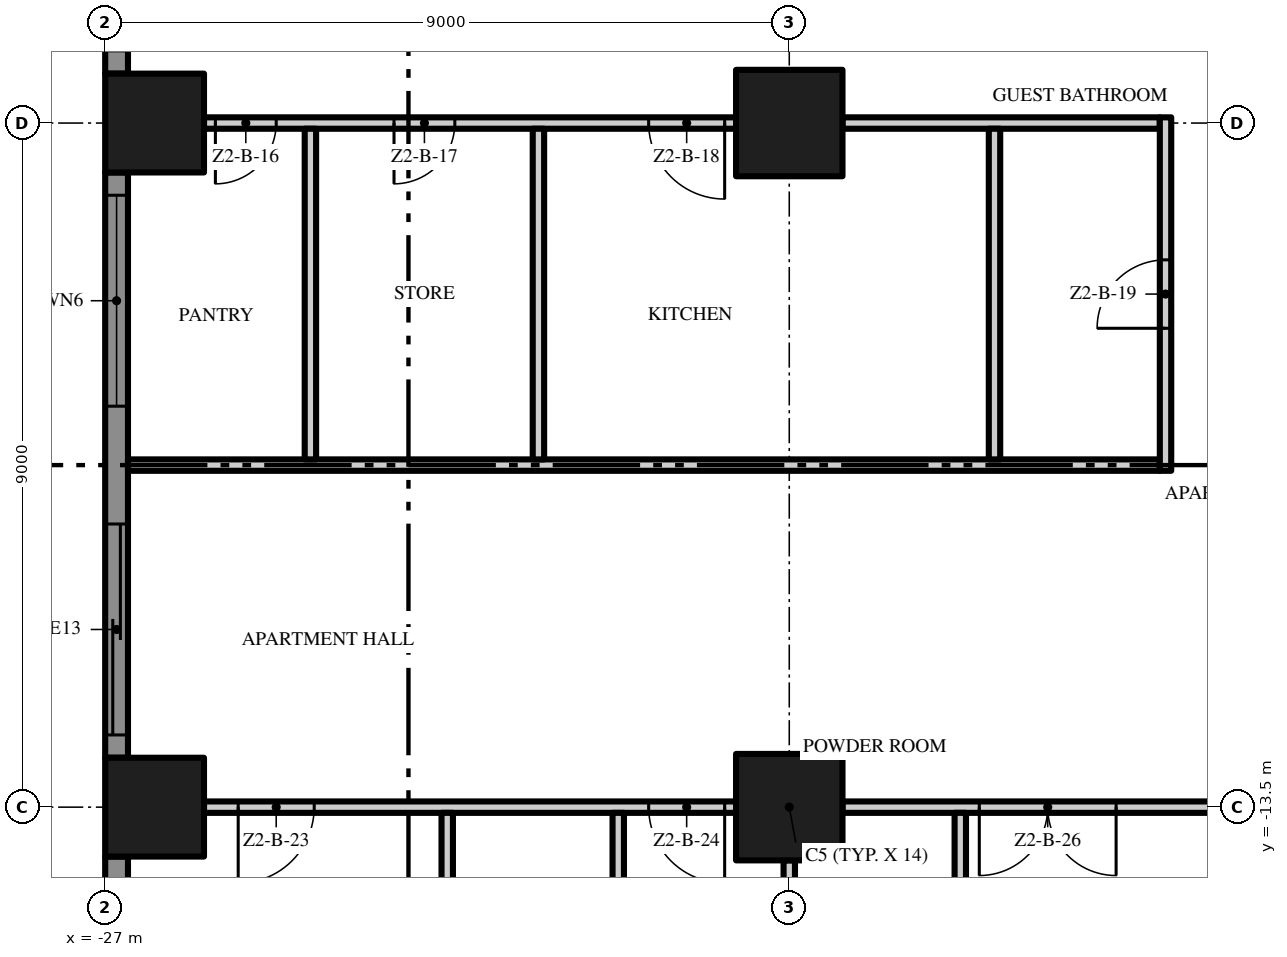
"""IFC4 building model, lengths in metres.
Left out: names, types, materials, properties, quantities, classifications, styles, units other than length and angle.
Written with IfcOpenShell. Run it as: python <this file> out.ifc"""

import sys

from ifc_helpers import new_model, si_unit, direction, frame, frame_2d, origin, origin_2d, place, context, subcontext, project, spatial, polyline, rectangle, outline, extrude, element, fill, save


model = new_model("IFC4")
c1 = context("Model", 3, precision=1e-05, world=origin(), true_north=direction((0.0, 1.0)))
c2 = subcontext(c1, "Body", "Model", "MODEL_VIEW")
j1 = project(units=[si_unit("LENGTHUNIT", "METRE"), si_unit("PLANEANGLEUNIT", "RADIAN")], contexts=[c1])
p1 = place(None, origin())
s1 = spatial("IfcSite", under=j1, at=p1, CompositionType="ELEMENT")
p2 = place(p1, origin())
s2 = spatial("IfcBuilding", under=s1, at=p2, CompositionType="ELEMENT")
p3 = place(p2, frame((0.0, 0.0, 88.4)))
s3 = spatial("IfcBuildingStorey", under=s2, at=p3, CompositionType="ELEMENT", Elevation=88.4)
for number, where, z_axis, x_axis in (
    (1, (-18.0, -13.5, 0.0), (0.0, 0.0, 1.0), (1.0, 0.0, 0.0)),
    (2, (-18.0, -4.5, 0.0), (0.0, 0.0, 1.0), (1.0, 0.0, 0.0)),
):
    element("IfcColumn", number, at=place(p3, frame(where, z_axis=z_axis, x_axis=x_axis)), inside=s3, PredefinedType="COLUMN", context=c2, shape_type="SweptSolid", body=[
        extrude(rectangle(XDim=1.4, YDim=1.4, at=origin_2d()), origin(), (0.0, 0.0, 1.0), 3.5),
    ])
for number, where, z_axis, x_axis in (
    (3, (-26.35, -13.5, 0.0), (0.0, 0.0, 1.0), (1.0, 0.0, 0.0)),
    (4, (-26.35, -4.5, 0.0), (0.0, 0.0, 1.0), (1.0, 0.0, 0.0)),
):
    element("IfcColumn", number, at=place(p3, frame(where, z_axis=z_axis, x_axis=x_axis)), inside=s3, PredefinedType="COLUMN", context=c2, shape_type="SweptSolid", body=[
        extrude(rectangle(XDim=1.3, YDim=1.3, at=origin_2d()), origin(), (0.0, 0.0, 1.0), 3.5),
    ])
p4 = place(p3, frame((-26.85, -3.85, 0.0), z_axis=(0.0, 0.0, 1.0), x_axis=(0.0, 1.0, 0.0)))
e5 = element("IfcWall", 5, at=p4, inside=s3, PredefinedType="SOLIDWALL", context=c2, shape_type="SweptSolid", body=[
    extrude(rectangle(XDim=7.7, YDim=0.3, at=frame_2d((3.85, 0.0))), origin(), (0.0, 0.0, 1.0), 3.5),
])
p5 = place(p4, frame((4.625, 0.0, 0.0)))
e6 = element("IfcOpeningElement", 6, at=p5, cuts=e5, PredefinedType="OPENING", context=c2, shape_type="SweptSolid", body=[
    extrude(rectangle(XDim=2.775, YDim=2.4, at=frame_2d((1.387, 1.2))), frame((0.0, 0.16, 0.0), z_axis=(0.0, -1.0, 0.0), x_axis=(1.0, 0.0, 0.0)), (0.0, 0.0, 1.0), 0.32),
])
p6 = place(p4, frame((0.3, 0.0, 0.45)))
e7 = element("IfcOpeningElement", 7, at=p6, cuts=e5, PredefinedType="OPENING", context=c2, shape_type="SweptSolid", body=[
    extrude(rectangle(XDim=2.775, YDim=2.65, at=frame_2d((1.387, 1.325))), frame((0.0, 0.16, 0.0), z_axis=(0.0, -1.0, 0.0), x_axis=(1.0, 0.0, 0.0)), (0.0, 0.0, 1.0), 0.32),
])
p7 = place(p3, frame((-26.85, -12.85, 0.0), z_axis=(0.0, 0.0, 1.0), x_axis=(0.0, 1.0, 0.0)))
e8 = element("IfcWall", 8, at=p7, inside=s3, PredefinedType="SOLIDWALL", context=c2, shape_type="SweptSolid", body=[
    extrude(rectangle(XDim=7.7, YDim=0.3, at=frame_2d((3.85, 0.0))), origin(), (0.0, 0.0, 1.0), 3.5),
])
p8 = place(p7, frame((4.625, 0.0, 0.45)))
e9 = element("IfcOpeningElement", 9, at=p8, cuts=e8, PredefinedType="OPENING", context=c2, shape_type="SweptSolid", body=[
    extrude(rectangle(XDim=2.775, YDim=2.65, at=frame_2d((1.387, 1.325))), frame((0.0, 0.16, 0.0), z_axis=(0.0, -1.0, 0.0), x_axis=(1.0, 0.0, 0.0)), (0.0, 0.0, 1.0), 0.32),
])
p9 = place(p7, frame((0.3, 0.0, 0.0)))
e10 = element("IfcOpeningElement", 10, at=p9, cuts=e8, PredefinedType="OPENING", context=c2, shape_type="SweptSolid", body=[
    extrude(rectangle(XDim=2.775, YDim=2.4, at=frame_2d((1.387, 1.2))), frame((0.0, 0.16, 0.0), z_axis=(0.0, -1.0, 0.0), x_axis=(1.0, 0.0, 0.0)), (0.0, 0.0, 1.0), 0.32),
])
p10 = place(p3, frame((-26.85, -18.0, 0.0), z_axis=(0.0, 0.0, 1.0), x_axis=(0.0, 1.0, 0.0)))
e11 = element("IfcWall", 11, at=p10, inside=s3, PredefinedType="SOLIDWALL", context=c2, shape_type="SweptSolid", body=[
    extrude(rectangle(XDim=3.85, YDim=0.3, at=frame_2d((1.925, 0.0))), origin(), (0.0, 0.0, 1.0), 3.5),
])
p11 = place(p10, frame((0.775, 0.0, 0.45)))
e12 = element("IfcOpeningElement", 12, at=p11, cuts=e11, PredefinedType="OPENING", context=c2, shape_type="SweptSolid", body=[
    extrude(rectangle(XDim=2.775, YDim=2.65, at=frame_2d((1.387, 1.325))), frame((0.0, 0.16, 0.0), z_axis=(0.0, -1.0, 0.0), x_axis=(1.0, 0.0, 0.0)), (0.0, 0.0, 1.0), 0.32),
])
p12 = place(p3, origin())
e13 = element("IfcWall", 13, at=p12, inside=s3, PredefinedType="USERDEFINED", context=c2, shape_type="SweptSolid", body=[
    extrude(outline(polyline([(-29.649, 18.0), (-28.988, 16.5), (-28.255, 15.0), (-27.731, 13.5), (-27.6, 12.375), (-27.615, 12.0), (-27.951, 10.5), (-28.612, 9.0), (-29.345, 7.5), (-29.869, 6.0), (-30.0, 4.875), (-29.985, 4.5), (-29.649, 3.0), (-28.988, 1.5), (-28.255, 0.0), (-27.731, -1.5), (-27.6, -2.625), (-27.615, -3.0), (-27.951, -4.5), (-28.612, -6.0), (-29.345, -7.5), (-29.869, -9.0), (-30.0, -10.125), (-29.985, -10.5), (-29.649, -12.0), (-28.988, -13.5), (-28.255, -15.0), (-27.731, -16.5), (-27.6, -17.625), (-27.615, -18.0), (-27.365, -18.01), (-27.349, -17.615), (-27.486, -16.444), (-28.024, -14.904), (-28.761, -13.395), (-29.41, -11.921), (-29.736, -10.467), (-29.749, -10.135), (-29.624, -9.056), (-29.114, -7.596), (-28.385, -6.105), (-27.713, -4.579), (-27.366, -3.033), (-27.349, -2.615), (-27.486, -1.444), (-28.024, 0.096), (-28.761, 1.605), (-29.41, 3.079), (-29.736, 4.533), (-29.749, 4.865), (-29.624, 5.944), (-29.114, 7.404), (-28.385, 8.895), (-27.713, 10.421), (-27.366, 11.967), (-27.349, 12.385), (-27.486, 13.556), (-28.024, 15.096), (-28.761, 16.605), (-29.42, 18.101), (-29.649, 18.0)])), origin(), (0.0, 0.0, 1.0), 0.9),
])
p13 = place(p3, frame((-18.7, -13.5, 0.0), z_axis=(0.0, 0.0, 1.0), x_axis=(-1.0, 0.0, 0.0)))
e14 = element("IfcWall", 14, at=p13, inside=s3, PredefinedType="PARTITIONING", context=c2, shape_type="SweptSolid", body=[
    extrude(rectangle(XDim=7.0, YDim=0.15, at=frame_2d((3.5, 0.0))), origin(), (0.0, 0.0, 1.0), 3.5),
])
p14 = place(p13, frame((5.55, 0.0, 0.0)))
e15 = element("IfcOpeningElement", 15, at=p14, cuts=e14, PredefinedType="OPENING", context=c2, shape_type="SweptSolid", body=[
    extrude(rectangle(XDim=1.0, YDim=2.4, at=frame_2d((0.5, 1.2))), frame((0.0, 0.085, 0.0), z_axis=(0.0, -1.0, 0.0), x_axis=(1.0, 0.0, 0.0)), (0.0, 0.0, 1.0), 0.17),
])
p15 = place(p13, frame((0.15, 0.0, 0.0)))
e16 = element("IfcOpeningElement", 16, at=p15, cuts=e14, PredefinedType="OPENING", context=c2, shape_type="SweptSolid", body=[
    extrude(rectangle(XDim=1.0, YDim=2.4, at=frame_2d((0.5, 1.2))), frame((0.0, 0.085, 0.0), z_axis=(0.0, -1.0, 0.0), x_axis=(1.0, 0.0, 0.0)), (0.0, 0.0, 1.0), 0.17),
])
p16 = place(p3, frame((-9.7, -13.5, 0.0), z_axis=(0.0, 0.0, 1.0), x_axis=(-1.0, 0.0, 0.0)))
e17 = element("IfcWall", 17, at=p16, inside=s3, PredefinedType="PARTITIONING", context=c2, shape_type="SweptSolid", body=[
    extrude(rectangle(XDim=7.6, YDim=0.15, at=frame_2d((3.8, 0.0))), origin(), (0.0, 0.0, 1.0), 3.5),
])
p17 = place(p16, frame((4.0, 0.0, 0.0)))
e18 = element("IfcOpeningElement", 18, at=p17, cuts=e17, PredefinedType="OPENING", context=c2, shape_type="SweptSolid", body=[
    extrude(rectangle(XDim=1.8, YDim=2.4, at=frame_2d((0.9, 1.2))), frame((0.0, 0.085, 0.0), z_axis=(0.0, -1.0, 0.0), x_axis=(1.0, 0.0, 0.0)), (0.0, 0.0, 1.0), 0.17),
])
p18 = place(p3, frame((-26.7, -9.0, 0.0), z_axis=(0.0, 0.0, 1.0), x_axis=(1.0, 0.0, 0.0)))
e19 = element("IfcWall", 19, at=p18, inside=s3, PredefinedType="PARTITIONING", context=c2, shape_type="SweptSolid", body=[
    extrude(rectangle(XDim=13.575, YDim=0.15, at=frame_2d((6.787, 0.0))), origin(), (0.0, 0.0, 1.0), 3.5),
])
p19 = place(p3, frame((-18.7, -4.5, 0.0), z_axis=(0.0, 0.0, 1.0), x_axis=(-1.0, 0.0, 0.0)))
e20 = element("IfcWall", 20, at=p19, inside=s3, PredefinedType="PARTITIONING", context=c2, shape_type="SweptSolid", body=[
    extrude(rectangle(XDim=7.0, YDim=0.15, at=frame_2d((3.5, 0.0))), origin(), (0.0, 0.0, 1.0), 3.5),
])
p20 = place(p19, frame((6.05, 0.0, 0.0)))
e21 = element("IfcOpeningElement", 21, at=p20, cuts=e20, PredefinedType="OPENING", context=c2, shape_type="SweptSolid", body=[
    extrude(rectangle(XDim=0.8, YDim=2.0, at=frame_2d((0.4, 1.0))), frame((0.0, 0.085, 0.0), z_axis=(0.0, -1.0, 0.0), x_axis=(1.0, 0.0, 0.0)), (0.0, 0.0, 1.0), 0.17),
])
p21 = place(p19, frame((3.7, 0.0, 0.0)))
e22 = element("IfcOpeningElement", 22, at=p21, cuts=e20, PredefinedType="OPENING", context=c2, shape_type="SweptSolid", body=[
    extrude(rectangle(XDim=0.8, YDim=2.0, at=frame_2d((0.4, 1.0))), frame((0.0, 0.085, 0.0), z_axis=(0.0, -1.0, 0.0), x_axis=(1.0, 0.0, 0.0)), (0.0, 0.0, 1.0), 0.17),
])
p22 = place(p19, frame((0.15, 0.0, 0.0)))
e23 = element("IfcOpeningElement", 23, at=p22, cuts=e20, PredefinedType="OPENING", context=c2, shape_type="SweptSolid", body=[
    extrude(rectangle(XDim=1.0, YDim=2.4, at=frame_2d((0.5, 1.2))), frame((0.0, 0.085, 0.0), z_axis=(0.0, -1.0, 0.0), x_axis=(1.0, 0.0, 0.0)), (0.0, 0.0, 1.0), 0.17),
])
p23 = place(p3, frame((-17.3, -4.5, 0.0), z_axis=(0.0, 0.0, 1.0), x_axis=(1.0, 0.0, 0.0)))
e24 = element("IfcWall", 24, at=p23, inside=s3, PredefinedType="PARTITIONING", context=c2, shape_type="SweptSolid", body=[
    extrude(rectangle(XDim=4.175, YDim=0.15, at=frame_2d((2.087, 0.0))), origin(), (0.0, 0.0, 1.0), 3.5),
])
p24 = place(p3, frame((-24.3, -8.925, 0.0), z_axis=(0.0, 0.0, 1.0), x_axis=(0.0, 1.0, 0.0)))
e25 = element("IfcWall", 25, at=p24, inside=s3, PredefinedType="PARTITIONING", context=c2, shape_type="SweptSolid", body=[
    extrude(rectangle(XDim=4.35, YDim=0.15, at=frame_2d((2.175, 0.0))), origin(), (0.0, 0.0, 1.0), 3.5),
])
p25 = place(p3, frame((-22.5, -17.35, 0.0), z_axis=(0.0, 0.0, 1.0), x_axis=(0.0, 1.0, 0.0)))
e26 = element("IfcWall", 26, at=p25, inside=s3, PredefinedType="PARTITIONING", context=c2, shape_type="SweptSolid", body=[
    extrude(rectangle(XDim=3.775, YDim=0.15, at=frame_2d((1.887, 0.0))), origin(), (0.0, 0.0, 1.0), 3.5),
])
p26 = place(p3, frame((-21.3, -8.925, 0.0), z_axis=(0.0, 0.0, 1.0), x_axis=(0.0, 1.0, 0.0)))
e27 = element("IfcWall", 27, at=p26, inside=s3, PredefinedType="PARTITIONING", context=c2, shape_type="SweptSolid", body=[
    extrude(rectangle(XDim=4.35, YDim=0.15, at=frame_2d((2.175, 0.0))), origin(), (0.0, 0.0, 1.0), 3.5),
])
p27 = place(p3, frame((-20.25, -16.575, 0.0), z_axis=(0.0, 0.0, 1.0), x_axis=(0.0, 1.0, 0.0)))
e28 = element("IfcWall", 28, at=p27, inside=s3, PredefinedType="PARTITIONING", context=c2, shape_type="SweptSolid", body=[
    extrude(rectangle(XDim=3.0, YDim=0.15, at=frame_2d((1.5, 0.0))), origin(), (0.0, 0.0, 1.0), 3.5),
])
p28 = place(p3, frame((-18.0, -21.2, 0.0), z_axis=(0.0, 0.0, 1.0), x_axis=(0.0, 1.0, 0.0)))
e29 = element("IfcWall", 29, at=p28, inside=s3, PredefinedType="PARTITIONING", context=c2, shape_type="SweptSolid", body=[
    extrude(rectangle(XDim=7.0, YDim=0.15, at=frame_2d((3.5, 0.0))), origin(), (0.0, 0.0, 1.0), 3.5),
])
p29 = place(p3, frame((-15.75, -16.575, 0.0), z_axis=(0.0, 0.0, 1.0), x_axis=(0.0, 1.0, 0.0)))
e30 = element("IfcWall", 30, at=p29, inside=s3, PredefinedType="PARTITIONING", context=c2, shape_type="SweptSolid", body=[
    extrude(rectangle(XDim=3.0, YDim=0.15, at=frame_2d((1.5, 0.0))), origin(), (0.0, 0.0, 1.0), 3.5),
])
p30 = place(p3, frame((-15.3, -8.925, 0.0), z_axis=(0.0, 0.0, 1.0), x_axis=(0.0, 1.0, 0.0)))
e31 = element("IfcWall", 31, at=p30, inside=s3, PredefinedType="PARTITIONING", context=c2, shape_type="SweptSolid", body=[
    extrude(rectangle(XDim=4.35, YDim=0.15, at=frame_2d((2.175, 0.0))), origin(), (0.0, 0.0, 1.0), 3.5),
])
p31 = place(p3, frame((-13.05, -9.075, 0.0), z_axis=(0.0, 0.0, 1.0), x_axis=(0.0, 1.0, 0.0)))
e32 = element("IfcWall", 32, at=p31, inside=s3, PredefinedType="PARTITIONING", context=c2, shape_type="SweptSolid", body=[
    extrude(rectangle(XDim=4.65, YDim=0.15, at=frame_2d((2.325, 0.0))), origin(), (0.0, 0.0, 1.0), 3.5),
])
p32 = place(p31, frame((1.875, 0.0, 0.0)))
e33 = element("IfcOpeningElement", 33, at=p32, cuts=e32, PredefinedType="OPENING", context=c2, shape_type="SweptSolid", body=[
    extrude(rectangle(XDim=0.9, YDim=2.1, at=frame_2d((0.45, 1.05))), frame((0.0, 0.085, 0.0), z_axis=(0.0, -1.0, 0.0), x_axis=(1.0, 0.0, 0.0)), (0.0, 0.0, 1.0), 0.17),
])
p33 = place(p8, origin())
e34 = element("IfcWindow", 34, at=p33, inside=s3, PartitioningType="SINGLE_PANEL", PredefinedType="WINDOW", context=c2, shape_type="SweptSolid", body=[
    extrude(rectangle(XDim=2.775, YDim=2.65, at=frame_2d((1.387, 1.325))), frame((0.0, 0.03, 0.0), z_axis=(0.0, -1.0, 0.0), x_axis=(1.0, 0.0, 0.0)), (0.0, 0.0, 1.0), 0.06),
])
fill(e9, e34)
p34 = place(p9, origin())
e35 = element("IfcDoor", 35, at=p34, inside=s3, OperationType="SINGLE_SWING_LEFT", PredefinedType="DOOR", context=c2, shape_type="SweptSolid", body=[
    extrude(rectangle(XDim=2.775, YDim=2.4, at=frame_2d((1.387, 1.2))), frame((0.0, 0.025, 0.0), z_axis=(0.0, -1.0, 0.0), x_axis=(1.0, 0.0, 0.0)), (0.0, 0.0, 1.0), 0.05),
])
fill(e10, e35)
p35 = place(p20, origin())
e36 = element("IfcDoor", 36, at=p35, inside=s3, OperationType="SINGLE_SWING_RIGHT", PredefinedType="DOOR", context=c2, shape_type="SweptSolid", body=[
    extrude(rectangle(XDim=0.8, YDim=2.0, at=frame_2d((0.4, 1.0))), frame((0.0, 0.025, 0.0), z_axis=(0.0, -1.0, 0.0), x_axis=(1.0, 0.0, 0.0)), (0.0, 0.0, 1.0), 0.05),
])
fill(e21, e36)
p36 = place(p21, origin())
e37 = element("IfcDoor", 37, at=p36, inside=s3, OperationType="SINGLE_SWING_RIGHT", PredefinedType="DOOR", context=c2, shape_type="SweptSolid", body=[
    extrude(rectangle(XDim=0.8, YDim=2.0, at=frame_2d((0.4, 1.0))), frame((0.0, 0.025, 0.0), z_axis=(0.0, -1.0, 0.0), x_axis=(1.0, 0.0, 0.0)), (0.0, 0.0, 1.0), 0.05),
])
fill(e22, e37)
p37 = place(p22, origin())
e38 = element("IfcDoor", 38, at=p37, inside=s3, OperationType="SINGLE_SWING_LEFT", PredefinedType="DOOR", context=c2, shape_type="SweptSolid", body=[
    extrude(rectangle(XDim=1.0, YDim=2.4, at=frame_2d((0.5, 1.2))), frame((0.0, 0.025, 0.0), z_axis=(0.0, -1.0, 0.0), x_axis=(1.0, 0.0, 0.0)), (0.0, 0.0, 1.0), 0.05),
])
fill(e23, e38)
p38 = place(p32, origin())
e39 = element("IfcDoor", 39, at=p38, inside=s3, OperationType="SINGLE_SWING_LEFT", PredefinedType="DOOR", context=c2, shape_type="SweptSolid", body=[
    extrude(rectangle(XDim=0.9, YDim=2.1, at=frame_2d((0.45, 1.05))), frame((0.0, 0.025, 0.0), z_axis=(0.0, -1.0, 0.0), x_axis=(1.0, 0.0, 0.0)), (0.0, 0.0, 1.0), 0.05),
])
fill(e33, e39)
p39 = place(p14, origin())
e40 = element("IfcDoor", 40, at=p39, inside=s3, OperationType="SINGLE_SWING_RIGHT", PredefinedType="DOOR", context=c2, shape_type="SweptSolid", body=[
    extrude(rectangle(XDim=1.0, YDim=2.4, at=frame_2d((0.5, 1.2))), frame((0.0, 0.025, 0.0), z_axis=(0.0, -1.0, 0.0), x_axis=(1.0, 0.0, 0.0)), (0.0, 0.0, 1.0), 0.05),
])
fill(e15, e40)
p40 = place(p15, origin())
e41 = element("IfcDoor", 41, at=p40, inside=s3, OperationType="SINGLE_SWING_LEFT", PredefinedType="DOOR", context=c2, shape_type="SweptSolid", body=[
    extrude(rectangle(XDim=1.0, YDim=2.4, at=frame_2d((0.5, 1.2))), frame((0.0, 0.025, 0.0), z_axis=(0.0, -1.0, 0.0), x_axis=(1.0, 0.0, 0.0)), (0.0, 0.0, 1.0), 0.05),
])
fill(e16, e41)
p41 = place(p17, origin())
e42 = element("IfcDoor", 42, at=p41, inside=s3, OperationType="DOUBLE_DOOR_SINGLE_SWING", PredefinedType="DOOR", context=c2, shape_type="SweptSolid", body=[
    extrude(rectangle(XDim=1.8, YDim=2.4, at=frame_2d((0.9, 1.2))), frame((0.0, 0.025, 0.0), z_axis=(0.0, -1.0, 0.0), x_axis=(1.0, 0.0, 0.0)), (0.0, 0.0, 1.0), 0.05),
])
fill(e18, e42)
save(model, sys.argv[1])
